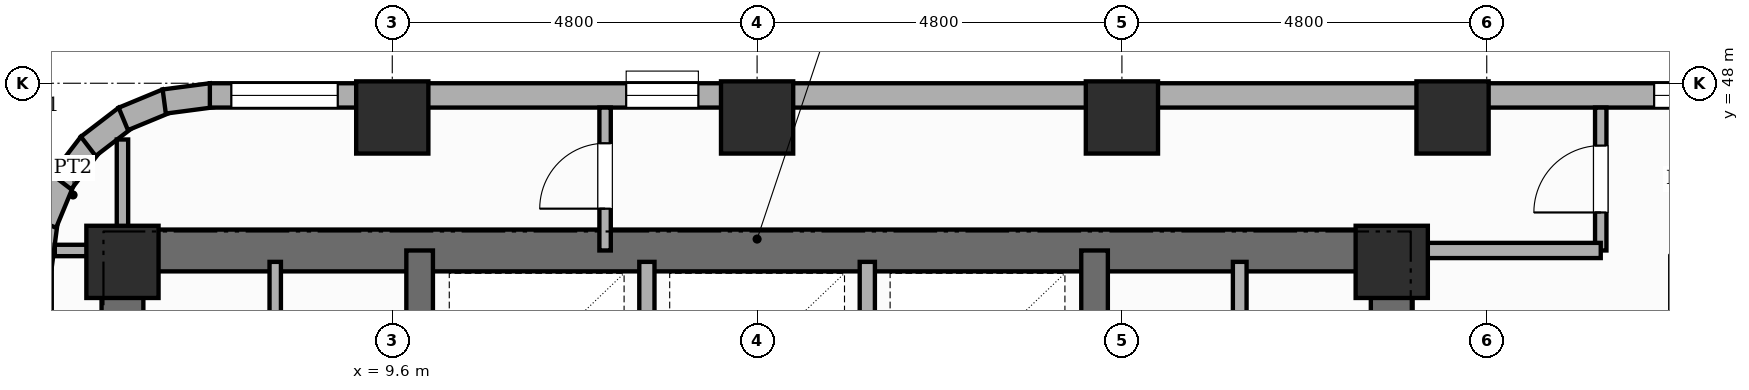
"""IFC4 building model, lengths in metres.
Left out: names, types, materials, properties, quantities, classifications, styles, units other than length and angle.
Written with IfcOpenShell. Run it as: python <this file> out.ifc"""

import sys

from ifc_helpers import new_model, si_unit, direction, frame, frame_2d, origin, origin_2d, place, context, subcontext, project, spatial, rectangle, extrude, element, fill, save


model = new_model("IFC4")
c1 = context("Model", 3, precision=1e-05, world=origin(), true_north=direction((0.0, 1.0)))
c2 = subcontext(c1, "Body", "Model", "MODEL_VIEW")
j1 = project(units=[si_unit("LENGTHUNIT", "METRE"), si_unit("PLANEANGLEUNIT", "RADIAN")], contexts=[c1])
p1 = place(None, origin())
s1 = spatial("IfcSite", under=j1, at=p1, CompositionType="ELEMENT")
p2 = place(p1, origin())
s2 = spatial("IfcBuilding", under=s1, at=p2, CompositionType="ELEMENT")
p3 = place(p2, frame((0.0, 0.0, 110.8)))
s3 = spatial("IfcBuildingStorey", under=s2, at=p3, CompositionType="ELEMENT", Elevation=110.8)
p4 = place(p3, frame((6.05, 30.625, 0.0), z_axis=(0.0, 0.0, 1.0), x_axis=(0.0, 1.0, 0.0)))
e1 = element("IfcWall", 1, at=p4, inside=s3, PredefinedType="SHEAR", context=c2, shape_type="SweptSolid", body=[
    extrude(rectangle(XDim=15.45, YDim=0.55, at=frame_2d((7.725, 0.0))), origin(), (0.0, 0.0, 1.0), 3.6),
])
p5 = place(p4, frame((10.725, 0.0, 0.0)))
e2 = element("IfcOpeningElement", 2, at=p5, cuts=e1, PredefinedType="OPENING", context=c2, shape_type="SweptSolid", body=[
    extrude(rectangle(XDim=0.95, YDim=2.15, at=frame_2d((0.475, 1.075))), frame((0.0, 0.285, 0.0), z_axis=(0.0, -1.0, 0.0), x_axis=(1.0, 0.0, 0.0)), (0.0, 0.0, 1.0), 0.57),
])
p6 = place(p3, frame((22.75, 30.625, 0.0), z_axis=(0.0, 0.0, 1.0), x_axis=(0.0, 1.0, 0.0)))
e3 = element("IfcWall", 3, at=p6, inside=s3, PredefinedType="SHEAR", context=c2, shape_type="SweptSolid", body=[
    extrude(rectangle(XDim=15.45, YDim=0.55, at=frame_2d((7.725, 0.0))), origin(), (0.0, 0.0, 1.0), 3.6),
])
p7 = place(p6, frame((10.725, 0.0, 0.0)))
e4 = element("IfcOpeningElement", 4, at=p7, cuts=e3, PredefinedType="OPENING", context=c2, shape_type="SweptSolid", body=[
    extrude(rectangle(XDim=1.0, YDim=2.15, at=frame_2d((0.5, 1.075))), frame((0.0, 0.285, 0.0), z_axis=(0.0, -1.0, 0.0), x_axis=(1.0, 0.0, 0.0)), (0.0, 0.0, 1.0), 0.57),
])
p8 = place(p3, frame((6.05, 45.8, 0.0), z_axis=(0.0, 0.0, 1.0), x_axis=(1.0, 0.0, 0.0)))
e5 = element("IfcWall", 5, at=p8, inside=s3, PredefinedType="SHEAR", context=c2, shape_type="SweptSolid", body=[
    extrude(rectangle(XDim=16.7, YDim=0.55, at=frame_2d((8.35, 0.0))), origin(), (0.0, 0.0, 1.0), 3.6),
])
p9 = place(p3, frame((9.96, 30.9, 0.0), z_axis=(0.0, 0.0, 1.0), x_axis=(0.0, 1.0, 0.0)))
e6 = element("IfcWall", 6, at=p9, inside=s3, PredefinedType="SHEAR", context=c2, shape_type="SweptSolid", body=[
    extrude(rectangle(XDim=14.9, YDim=0.35, at=frame_2d((7.45, 0.0))), origin(), (0.0, 0.0, 1.0), 3.6),
])
p10 = place(p9, frame((0.65, 0.0, 0.0)))
e7 = element("IfcOpeningElement", 7, at=p10, cuts=e6, PredefinedType="OPENING", context=c2, shape_type="SweptSolid", body=[
    extrude(rectangle(XDim=0.95, YDim=2.1, at=frame_2d((0.475, 1.05))), frame((0.0, 0.185, 0.0), z_axis=(0.0, -1.0, 0.0), x_axis=(1.0, 0.0, 0.0)), (0.0, 0.0, 1.0), 0.37),
])
p11 = place(p9, frame((10.45, 0.0, 0.0)))
e8 = element("IfcOpeningElement", 8, at=p11, cuts=e6, PredefinedType="OPENING", context=c2, shape_type="SweptSolid", body=[
    extrude(rectangle(XDim=1.0, YDim=2.15, at=frame_2d((0.5, 1.075))), frame((0.0, 0.185, 0.0), z_axis=(0.0, -1.0, 0.0), x_axis=(1.0, 0.0, 0.0)), (0.0, 0.0, 1.0), 0.37),
])
p12 = place(p3, frame((18.84, 30.9, 0.0), z_axis=(0.0, 0.0, 1.0), x_axis=(0.0, 1.0, 0.0)))
e9 = element("IfcWall", 9, at=p12, inside=s3, PredefinedType="SHEAR", context=c2, shape_type="SweptSolid", body=[
    extrude(rectangle(XDim=14.9, YDim=0.35, at=frame_2d((7.45, 0.0))), origin(), (0.0, 0.0, 1.0), 3.6),
])
p13 = place(p12, frame((0.65, 0.0, 0.0)))
e10 = element("IfcOpeningElement", 10, at=p13, cuts=e9, PredefinedType="OPENING", context=c2, shape_type="SweptSolid", body=[
    extrude(rectangle(XDim=0.95, YDim=2.1, at=frame_2d((0.475, 1.05))), frame((0.0, 0.185, 0.0), z_axis=(0.0, -1.0, 0.0), x_axis=(1.0, 0.0, 0.0)), (0.0, 0.0, 1.0), 0.37),
])
p14 = place(p12, frame((10.45, 0.0, 0.0)))
e11 = element("IfcOpeningElement", 11, at=p14, cuts=e9, PredefinedType="OPENING", context=c2, shape_type="SweptSolid", body=[
    extrude(rectangle(XDim=1.0, YDim=2.15, at=frame_2d((0.5, 1.075))), frame((0.0, 0.185, 0.0), z_axis=(0.0, -1.0, 0.0), x_axis=(1.0, 0.0, 0.0)), (0.0, 0.0, 1.0), 0.37),
])
for number, where, z_axis, x_axis in (
    (12, (6.05, 45.65, 0.0), (0.0, 0.0, 1.0), (1.0, 0.0, 0.0)),
    (13, (9.6, 47.55, 0.0), (0.0, 0.0, 1.0), (1.0, 0.0, 0.0)),
    (14, (14.4, 47.55, 0.0), (0.0, 0.0, 1.0), (1.0, 0.0, 0.0)),
    (15, (19.2, 47.55, 0.0), (0.0, 0.0, 1.0), (1.0, 0.0, 0.0)),
    (16, (22.75, 45.65, 0.0), (0.0, 0.0, 1.0), (1.0, 0.0, 0.0)),
    (17, (23.55, 47.55, 0.0), (0.0, 0.0, 1.0), (1.0, 0.0, 0.0)),
):
    element("IfcColumn", number, at=place(p3, frame(where, z_axis=z_axis, x_axis=x_axis)), inside=s3, PredefinedType="COLUMN", context=c2, shape_type="SweptSolid", body=[
        extrude(rectangle(XDim=0.95, YDim=0.95, at=origin_2d()), origin(), (0.0, 0.0, 1.0), 3.6),
    ])
for number, where, z_axis, x_axis in (
    (18, (4.958, 45.579, 0.0), (0.0, 0.0, 1.0), (0.131, 0.991, 0.0)),
    (19, (5.03, 46.16, 0.0), (0.0, 0.0, 1.0), (0.383, 0.924, 0.0)),
):
    element("IfcWall", number, at=place(p3, frame(where, z_axis=z_axis, x_axis=x_axis)), inside=s3, PredefinedType="STANDARD", context=c2, shape_type="SweptSolid", body=[
        extrude(rectangle(XDim=0.626, YDim=0.32, at=frame_2d((0.313, 0.0))), origin(), (0.0, 0.0, 1.0), 3.36),
    ])
p15 = place(p3, frame((5.248, 46.703, 0.0), z_axis=(0.0, 0.0, 1.0), x_axis=(0.608938521285, 0.7932174212, 0.0)))
e20 = element("IfcWall", 20, at=p15, inside=s3, PredefinedType="STANDARD", context=c2, shape_type="SweptSolid", body=[
    extrude(rectangle(XDim=0.627, YDim=0.32, at=frame_2d((0.313, 0.0))), origin(), (0.0, 0.0, 1.0), 3.36),
])
p16 = place(p3, frame((5.6, 47.17, 0.0), z_axis=(0.0, 0.0, 1.0), x_axis=(0.793405610854, 0.608693302629, 0.0)))
e21 = element("IfcWall", 21, at=p16, inside=s3, PredefinedType="STANDARD", context=c2, shape_type="SweptSolid", body=[
    extrude(rectangle(XDim=0.626, YDim=0.32, at=frame_2d((0.313, 0.0))), origin(), (0.0, 0.0, 1.0), 3.36),
])
p17 = place(p3, frame((6.061, 47.531, 0.0), z_axis=(0.0, 0.0, 1.0), x_axis=(0.923836271867, 0.382787856107, 0.0)))
e22 = element("IfcWall", 22, at=p17, inside=s3, PredefinedType="STANDARD", context=c2, shape_type="SweptSolid", body=[
    extrude(rectangle(XDim=0.626, YDim=0.32, at=frame_2d((0.313, 0.0))), origin(), (0.0, 0.0, 1.0), 3.36),
])
p18 = place(p3, frame((6.6, 47.76, 0.0), z_axis=(0.0, 0.0, 1.0), x_axis=(0.991447664465, 0.130504898859, 0.0)))
e23 = element("IfcWall", 23, at=p18, inside=s3, PredefinedType="STANDARD", context=c2, shape_type="SweptSolid", body=[
    extrude(rectangle(XDim=0.627, YDim=0.32, at=frame_2d((0.313, 0.0))), origin(), (0.0, 0.0, 1.0), 3.36),
])
p19 = place(p3, frame((7.2, 47.84, 0.0), z_axis=(0.0, 0.0, 1.0), x_axis=(1.0, 0.0, 0.0)))
e24 = element("IfcWall", 24, at=p19, inside=s3, PredefinedType="STANDARD", context=c2, shape_type="SweptSolid", body=[
    extrude(rectangle(XDim=43.2, YDim=0.32, at=frame_2d((21.6, 0.0))), origin(), (0.0, 0.0, 1.0), 2.54),
])
p20 = place(p19, frame((19.002, 0.0, 0.65)))
e25 = element("IfcOpeningElement", 25, at=p20, cuts=e24, PredefinedType="OPENING", context=c2, shape_type="SweptSolid", body=[
    extrude(rectangle(XDim=1.4, YDim=1.1, at=frame_2d((0.7, 0.55))), frame((0.0, 0.17, 0.0), z_axis=(0.0, -1.0, 0.0), x_axis=(1.0, 0.0, 0.0)), (0.0, 0.0, 1.0), 0.34),
])
p21 = place(p19, frame((0.282, 0.0, 0.65)))
e26 = element("IfcOpeningElement", 26, at=p21, cuts=e24, PredefinedType="OPENING", context=c2, shape_type="SweptSolid", body=[
    extrude(rectangle(XDim=1.4, YDim=1.1, at=frame_2d((0.7, 0.55))), frame((0.0, 0.17, 0.0), z_axis=(0.0, -1.0, 0.0), x_axis=(1.0, 0.0, 0.0)), (0.0, 0.0, 1.0), 0.34),
])
p22 = place(p19, frame((5.478, 0.0, 0.45)))
e27 = element("IfcOpeningElement", 27, at=p22, cuts=e24, PredefinedType="OPENING", context=c2, shape_type="SweptSolid", body=[
    extrude(rectangle(XDim=0.95, YDim=1.8, at=frame_2d((0.475, 0.9))), frame((0.0, 0.17, 0.0), z_axis=(0.0, -1.0, 0.0), x_axis=(1.0, 0.0, 0.0)), (0.0, 0.0, 1.0), 0.34),
])
for number, where, z_axis, x_axis in (
    (28, (12.95, 43.1, 0.0), (0.0, 0.0, 1.0), (0.0, 1.0, 0.0)),
    (29, (15.85, 43.1, 0.0), (0.0, 0.0, 1.0), (0.0, 1.0, 0.0)),
):
    element("IfcWall", number, at=place(p3, frame(where, z_axis=z_axis, x_axis=x_axis)), inside=s3, PredefinedType="POLYGONAL", context=c2, shape_type="SweptSolid", body=[
        extrude(rectangle(XDim=2.55, YDim=0.2, at=frame_2d((1.275, 0.0))), origin(), (0.0, 0.0, 1.0), 3.36),
    ])
p23 = place(p3, frame((8.06, 43.05, 0.0), z_axis=(0.0, 0.0, 1.0), x_axis=(0.0, 1.0, 0.0)))
e30 = element("IfcWall", 30, at=p23, inside=s3, PredefinedType="PARTITIONING", context=c2, shape_type="SweptSolid", body=[
    extrude(rectangle(XDim=2.6, YDim=0.15, at=frame_2d((1.3, 0.0))), origin(), (0.0, 0.0, 1.0), 3.36),
])
p24 = place(p3, frame((20.75, 43.05, 0.0), z_axis=(0.0, 0.0, 1.0), x_axis=(0.0, 1.0, 0.0)))
e31 = element("IfcWall", 31, at=p24, inside=s3, PredefinedType="PLUMBINGWALL", context=c2, shape_type="SweptSolid", body=[
    extrude(rectangle(XDim=2.6, YDim=0.18, at=frame_2d((1.3, 0.0))), origin(), (0.0, 0.0, 1.0), 3.36),
])
p25 = place(p3, frame((5.16, 45.8, 0.0), z_axis=(0.0, 0.0, 1.0), x_axis=(1.0, 0.0, 0.0)))
e32 = element("IfcWall", 32, at=p25, inside=s3, PredefinedType="PARTITIONING", context=c2, shape_type="SweptSolid", body=[
    extrude(rectangle(XDim=0.89, YDim=0.15, at=frame_2d((0.445, 0.0))), origin(), (0.0, 0.0, 1.0), 3.36),
])
p26 = place(p3, frame((25.5, 45.8, 0.0), z_axis=(0.0, 0.0, 1.0), x_axis=(0.0, 1.0, 0.0)))
e33 = element("IfcWall", 33, at=p26, inside=s3, PredefinedType="PARTITIONING", context=c2, shape_type="SweptSolid", body=[
    extrude(rectangle(XDim=1.88, YDim=0.15, at=frame_2d((0.94, 0.0))), origin(), (0.0, 0.0, 1.0), 3.36),
])
p27 = place(p26, frame((0.5, 0.0, 0.0)))
e34 = element("IfcOpeningElement", 34, at=p27, cuts=e33, PredefinedType="OPENING", context=c2, shape_type="SweptSolid", body=[
    extrude(rectangle(XDim=0.88, YDim=2.1, at=frame_2d((0.44, 1.05))), frame((0.0, 0.085, 0.0), z_axis=(0.0, -1.0, 0.0), x_axis=(1.0, 0.0, 0.0)), (0.0, 0.0, 1.0), 0.17),
])
p28 = place(p3, frame((22.75, 45.8, 0.0), z_axis=(0.0, 0.0, 1.0), x_axis=(1.0, 0.0, 0.0)))
e35 = element("IfcWall", 35, at=p28, inside=s3, PredefinedType="PARTITIONING", context=c2, shape_type="SweptSolid", body=[
    extrude(rectangle(XDim=2.75, YDim=0.2, at=frame_2d((1.375, 0.0))), origin(), (0.0, 0.0, 1.0), 3.36),
])
p29 = place(p3, frame((6.05, 45.8, 0.0), z_axis=(0.0, 0.0, 1.0), x_axis=(0.0, 1.0, 0.0)))
e36 = element("IfcWall", 36, at=p29, inside=s3, PredefinedType="PARTITIONING", context=c2, shape_type="SweptSolid", body=[
    extrude(rectangle(XDim=1.46, YDim=0.15, at=frame_2d((0.73, 0.0))), origin(), (0.0, 0.0, 1.0), 3.36),
])
p30 = place(p3, frame((12.4, 45.8, 0.0), z_axis=(0.0, 0.0, 1.0), x_axis=(0.0, 1.0, 0.0)))
e37 = element("IfcWall", 37, at=p30, inside=s3, PredefinedType="PARTITIONING", context=c2, shape_type="SweptSolid", body=[
    extrude(rectangle(XDim=1.88, YDim=0.15, at=frame_2d((0.94, 0.0))), origin(), (0.0, 0.0, 1.0), 3.36),
])
p31 = place(p30, frame((0.55, 0.0, 0.0)))
e38 = element("IfcOpeningElement", 38, at=p31, cuts=e37, PredefinedType="OPENING", context=c2, shape_type="SweptSolid", body=[
    extrude(rectangle(XDim=0.86, YDim=2.1, at=frame_2d((0.43, 1.05))), frame((0.0, 0.085, 0.0), z_axis=(0.0, -1.0, 0.0), x_axis=(1.0, 0.0, 0.0)), (0.0, 0.0, 1.0), 0.17),
])
p32 = place(p20, origin())
e39 = element("IfcWindow", 39, at=p32, inside=s3, PartitioningType="SINGLE_PANEL", PredefinedType="WINDOW", context=c2, shape_type="SweptSolid", body=[
    extrude(rectangle(XDim=1.4, YDim=1.1, at=frame_2d((0.7, 0.55))), frame((0.0, 0.03, 0.0), z_axis=(0.0, -1.0, 0.0), x_axis=(1.0, 0.0, 0.0)), (0.0, 0.0, 1.0), 0.06),
])
fill(e25, e39)
p33 = place(p21, origin())
e40 = element("IfcWindow", 40, at=p33, inside=s3, PartitioningType="SINGLE_PANEL", PredefinedType="WINDOW", context=c2, shape_type="SweptSolid", body=[
    extrude(rectangle(XDim=1.4, YDim=1.1, at=frame_2d((0.7, 0.55))), frame((0.0, 0.03, 0.0), z_axis=(0.0, -1.0, 0.0), x_axis=(1.0, 0.0, 0.0)), (0.0, 0.0, 1.0), 0.06),
])
fill(e26, e40)
p34 = place(p22, origin())
e41 = element("IfcWindow", 41, at=p34, inside=s3, PartitioningType="SINGLE_PANEL", PredefinedType="WINDOW", context=c2, shape_type="SweptSolid", body=[
    extrude(rectangle(XDim=0.95, YDim=1.8, at=frame_2d((0.475, 0.9))), frame((0.0, 0.03, 0.0), z_axis=(0.0, -1.0, 0.0), x_axis=(1.0, 0.0, 0.0)), (0.0, 0.0, 1.0), 0.06),
])
fill(e27, e41)
p35 = place(p27, origin())
e42 = element("IfcDoor", 42, at=p35, inside=s3, OperationType="SINGLE_SWING_LEFT", PredefinedType="DOOR", context=c2, shape_type="SweptSolid", body=[
    extrude(rectangle(XDim=0.88, YDim=2.1, at=frame_2d((0.44, 1.05))), frame((0.0, 0.025, 0.0), z_axis=(0.0, -1.0, 0.0), x_axis=(1.0, 0.0, 0.0)), (0.0, 0.0, 1.0), 0.05),
])
fill(e34, e42)
p36 = place(p31, origin())
e43 = element("IfcDoor", 43, at=p36, inside=s3, OperationType="SINGLE_SWING_LEFT", PredefinedType="DOOR", context=c2, shape_type="SweptSolid", body=[
    extrude(rectangle(XDim=0.86, YDim=2.1, at=frame_2d((0.43, 1.05))), frame((0.0, 0.025, 0.0), z_axis=(0.0, -1.0, 0.0), x_axis=(1.0, 0.0, 0.0)), (0.0, 0.0, 1.0), 0.05),
])
fill(e38, e43)
save(model, sys.argv[1])
